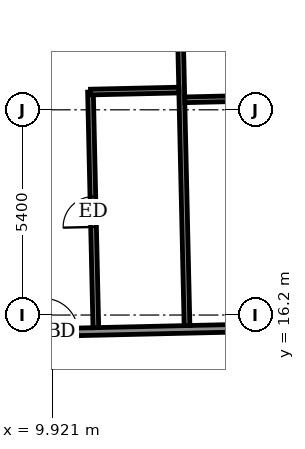
"""IFC4 building model, lengths in metres.
Left out: names, types, materials, properties, quantities, classifications, styles, units other than length and angle.
Written with IfcOpenShell. Run it as: python <this file> out.ifc"""

import sys

from ifc_helpers import new_model, si_unit, direction, frame, frame_2d, origin, place, context, subcontext, project, spatial, rectangle, extrude, element, fill, save


model = new_model("IFC4")
c1 = context("Model", 3, precision=1e-05, world=origin(), true_north=direction((0.0, 1.0)))
c2 = subcontext(c1, "Body", "Model", "MODEL_VIEW")
j1 = project(units=[si_unit("LENGTHUNIT", "METRE"), si_unit("PLANEANGLEUNIT", "RADIAN")], contexts=[c1])
p1 = place(None, origin())
s1 = spatial("IfcSite", under=j1, at=p1, CompositionType="ELEMENT")
p2 = place(p1, origin())
s2 = spatial("IfcBuilding", under=s1, at=p2, CompositionType="ELEMENT")
p3 = place(p2, frame((0.0, 0.0, 297.9)))
s3 = spatial("IfcBuildingStorey", under=s2, at=p3, CompositionType="ELEMENT", Elevation=297.9)
p4 = place(p3, frame((-26.401, 14.918, 0.0), z_axis=(0.0, 0.0, 1.0), x_axis=(0.99974239733, 0.022696673341, 0.0)))
e1 = element("IfcWall", 1, at=p4, inside=s3, PredefinedType="PARTITIONING", context=c2, shape_type="SweptSolid", body=[
    extrude(rectangle(XDim=55.386, YDim=0.2, at=frame_2d((27.693, 0.0))), origin(), (0.0, 0.0, 1.0), 3.05),
])
p5 = place(p4, frame((53.718, 0.0, 0.0)))
e2 = element("IfcOpeningElement", 2, at=p5, cuts=e1, PredefinedType="OPENING", context=c2, shape_type="SweptSolid", body=[
    extrude(rectangle(XDim=1.0, YDim=2.1, at=frame_2d((0.5, 1.05))), frame((0.0, 0.11, 0.0), z_axis=(0.0, -1.0, 0.0), x_axis=(1.0, 0.0, 0.0)), (0.0, 0.0, 1.0), 0.22),
])
p6 = place(p4, frame((49.325, 0.0, 0.0)))
e3 = element("IfcOpeningElement", 3, at=p6, cuts=e1, PredefinedType="OPENING", context=c2, shape_type="SweptSolid", body=[
    extrude(rectangle(XDim=0.9, YDim=2.1, at=frame_2d((0.45, 1.05))), frame((0.0, 0.11, 0.0), z_axis=(0.0, -1.0, 0.0), x_axis=(1.0, 0.0, 0.0)), (0.0, 0.0, 1.0), 0.22),
])
p7 = place(p4, frame((44.575, 0.0, 0.0)))
e4 = element("IfcOpeningElement", 4, at=p7, cuts=e1, PredefinedType="OPENING", context=c2, shape_type="SweptSolid", body=[
    extrude(rectangle(XDim=0.9, YDim=2.1, at=frame_2d((0.45, 1.05))), frame((0.0, 0.11, 0.0), z_axis=(0.0, -1.0, 0.0), x_axis=(1.0, 0.0, 0.0)), (0.0, 0.0, 1.0), 0.22),
])
p8 = place(p4, frame((42.725, 0.0, 0.0)))
e5 = element("IfcOpeningElement", 5, at=p8, cuts=e1, PredefinedType="OPENING", context=c2, shape_type="SweptSolid", body=[
    extrude(rectangle(XDim=0.9, YDim=2.1, at=frame_2d((0.45, 1.05))), frame((0.0, 0.11, 0.0), z_axis=(0.0, -1.0, 0.0), x_axis=(1.0, 0.0, 0.0)), (0.0, 0.0, 1.0), 0.22),
])
p9 = place(p4, frame((36.1, 0.0, 0.0)))
e6 = element("IfcOpeningElement", 6, at=p9, cuts=e1, PredefinedType="OPENING", context=c2, shape_type="SweptSolid", body=[
    extrude(rectangle(XDim=0.9, YDim=2.1, at=frame_2d((0.45, 1.05))), frame((0.0, 0.11, 0.0), z_axis=(0.0, -1.0, 0.0), x_axis=(1.0, 0.0, 0.0)), (0.0, 0.0, 1.0), 0.22),
])
p10 = place(p4, frame((34.25, 0.0, 0.0)))
e7 = element("IfcOpeningElement", 7, at=p10, cuts=e1, PredefinedType="OPENING", context=c2, shape_type="SweptSolid", body=[
    extrude(rectangle(XDim=0.9, YDim=2.1, at=frame_2d((0.45, 1.05))), frame((0.0, 0.11, 0.0), z_axis=(0.0, -1.0, 0.0), x_axis=(1.0, 0.0, 0.0)), (0.0, 0.0, 1.0), 0.22),
])
p11 = place(p4, frame((27.6, 0.0, 0.0)))
e8 = element("IfcOpeningElement", 8, at=p11, cuts=e1, PredefinedType="OPENING", context=c2, shape_type="SweptSolid", body=[
    extrude(rectangle(XDim=0.9, YDim=2.1, at=frame_2d((0.45, 1.05))), frame((0.0, 0.11, 0.0), z_axis=(0.0, -1.0, 0.0), x_axis=(1.0, 0.0, 0.0)), (0.0, 0.0, 1.0), 0.22),
])
p12 = place(p4, frame((25.775, 0.0, 0.0)))
e9 = element("IfcOpeningElement", 9, at=p12, cuts=e1, PredefinedType="OPENING", context=c2, shape_type="SweptSolid", body=[
    extrude(rectangle(XDim=0.9, YDim=2.1, at=frame_2d((0.45, 1.05))), frame((0.0, 0.11, 0.0), z_axis=(0.0, -1.0, 0.0), x_axis=(1.0, 0.0, 0.0)), (0.0, 0.0, 1.0), 0.22),
])
p13 = place(p4, frame((19.15, 0.0, 0.0)))
e10 = element("IfcOpeningElement", 10, at=p13, cuts=e1, PredefinedType="OPENING", context=c2, shape_type="SweptSolid", body=[
    extrude(rectangle(XDim=0.9, YDim=2.1, at=frame_2d((0.45, 1.05))), frame((0.0, 0.11, 0.0), z_axis=(0.0, -1.0, 0.0), x_axis=(1.0, 0.0, 0.0)), (0.0, 0.0, 1.0), 0.22),
])
p14 = place(p4, frame((17.3, 0.0, 0.0)))
e11 = element("IfcOpeningElement", 11, at=p14, cuts=e1, PredefinedType="OPENING", context=c2, shape_type="SweptSolid", body=[
    extrude(rectangle(XDim=0.9, YDim=2.1, at=frame_2d((0.45, 1.05))), frame((0.0, 0.11, 0.0), z_axis=(0.0, -1.0, 0.0), x_axis=(1.0, 0.0, 0.0)), (0.0, 0.0, 1.0), 0.22),
])
p15 = place(p4, frame((10.65, 0.0, 0.0)))
e12 = element("IfcOpeningElement", 12, at=p15, cuts=e1, PredefinedType="OPENING", context=c2, shape_type="SweptSolid", body=[
    extrude(rectangle(XDim=0.9, YDim=2.1, at=frame_2d((0.45, 1.05))), frame((0.0, 0.11, 0.0), z_axis=(0.0, -1.0, 0.0), x_axis=(1.0, 0.0, 0.0)), (0.0, 0.0, 1.0), 0.22),
])
p16 = place(p4, frame((8.8, 0.0, 0.0)))
e13 = element("IfcOpeningElement", 13, at=p16, cuts=e1, PredefinedType="OPENING", context=c2, shape_type="SweptSolid", body=[
    extrude(rectangle(XDim=0.9, YDim=2.1, at=frame_2d((0.45, 1.05))), frame((0.0, 0.11, 0.0), z_axis=(0.0, -1.0, 0.0), x_axis=(1.0, 0.0, 0.0)), (0.0, 0.0, 1.0), 0.22),
])
p17 = place(p4, frame((1.864, 0.0, 0.0)))
e14 = element("IfcOpeningElement", 14, at=p17, cuts=e1, PredefinedType="OPENING", context=c2, shape_type="SweptSolid", body=[
    extrude(rectangle(XDim=1.0, YDim=2.1, at=frame_2d((0.5, 1.05))), frame((0.0, 0.11, 0.0), z_axis=(0.0, -1.0, 0.0), x_axis=(1.0, 0.0, 0.0)), (0.0, 0.0, 1.0), 0.22),
])
p18 = place(p3, frame((11.06, 15.868, 0.0), z_axis=(0.0, 0.0, 1.0), x_axis=(-0.02275807565, 0.999741001456, 0.0)))
e15 = element("IfcWall", 15, at=p18, inside=s3, PredefinedType="PARTITIONING", context=c2, shape_type="SweptSolid", body=[
    extrude(rectangle(XDim=6.201, YDim=0.15, at=frame_2d((3.1, 0.0))), origin(), (0.0, 0.0, 1.0), 3.05),
])
p19 = place(p18, frame((2.65, 0.0, 0.0)))
e16 = element("IfcOpeningElement", 16, at=p19, cuts=e15, PredefinedType="OPENING", context=c2, shape_type="SweptSolid", body=[
    extrude(rectangle(XDim=0.8, YDim=2.1, at=frame_2d((0.4, 1.05))), frame((0.0, 0.085, 0.0), z_axis=(0.0, -1.0, 0.0), x_axis=(1.0, 0.0, 0.0)), (0.0, 0.0, 1.0), 0.17),
])
p20 = place(p3, frame((13.459, 15.923, 0.0), z_axis=(0.0, 0.0, 1.0), x_axis=(-0.022661475803, 0.999743195783, 0.0)))
e17 = element("IfcWall", 17, at=p20, inside=s3, PredefinedType="PARTITIONING", context=c2, shape_type="SweptSolid", body=[
    extrude(rectangle(XDim=12.4, YDim=0.15, at=frame_2d((6.2, 0.0))), origin(), (0.0, 0.0, 1.0), 2.5),
])
for number, where, z_axis, x_axis in (
    (18, (13.401, 21.863, 0.0), (0.0, 0.0, 1.0), (1.0, 0.023, 0.0)),
    (19, (10.921, 22.067, 0.0), (0.0, 0.0, 1.0), (1.0, 0.022, 0.0)),
):
    element("IfcWall", number, at=place(p3, frame(where, z_axis=z_axis, x_axis=x_axis)), inside=s3, PredefinedType="PARTITIONING", context=c2, shape_type="SweptSolid", body=[
        extrude(rectangle(XDim=2.326, YDim=0.15, at=frame_2d((1.163, 0.0))), origin(), (0.0, 0.0, 1.0), 3.05),
    ])
p21 = place(p9, origin())
e20 = element("IfcDoor", 20, at=p21, inside=s3, OperationType="SINGLE_SWING_RIGHT", PredefinedType="DOOR", context=c2, shape_type="SweptSolid", body=[
    extrude(rectangle(XDim=0.9, YDim=2.1, at=frame_2d((0.45, 1.05))), frame((0.0, 0.025, 0.0), z_axis=(0.0, -1.0, 0.0), x_axis=(1.0, 0.0, 0.0)), (0.0, 0.0, 1.0), 0.05),
])
fill(e6, e20)
p22 = place(p19, origin())
e21 = element("IfcDoor", 21, at=p22, inside=s3, OperationType="SINGLE_SWING_RIGHT", PredefinedType="DOOR", context=c2, shape_type="SweptSolid", body=[
    extrude(rectangle(XDim=0.8, YDim=2.1, at=frame_2d((0.4, 1.05))), frame((0.0, 0.025, 0.0), z_axis=(0.0, -1.0, 0.0), x_axis=(1.0, 0.0, 0.0)), (0.0, 0.0, 1.0), 0.05),
])
fill(e16, e21)
save(model, sys.argv[1])
